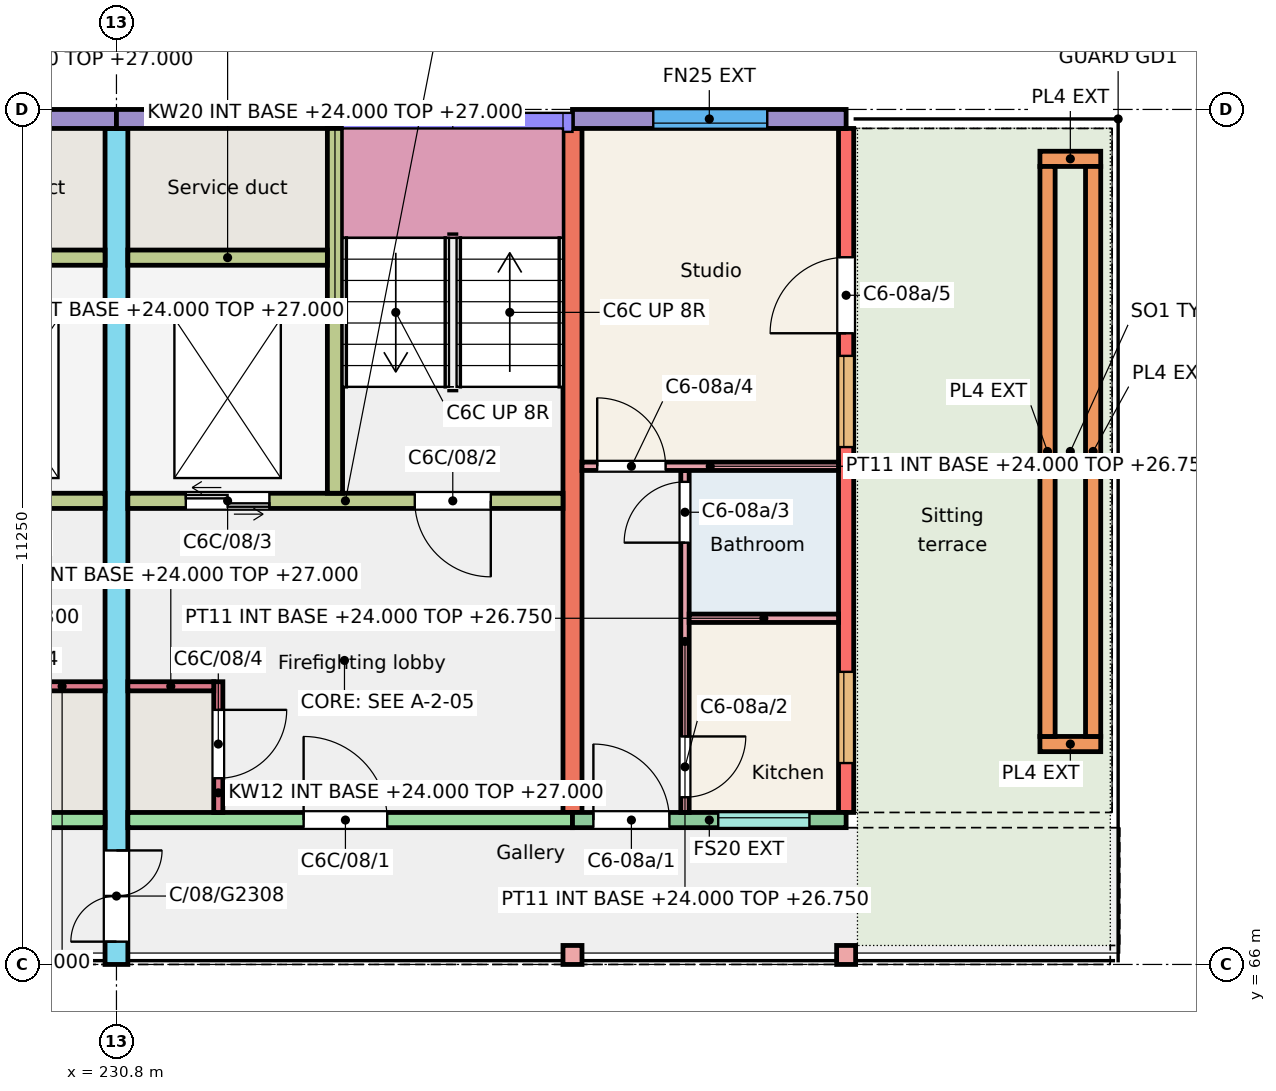
"""IFC4 building model, lengths in metres.
Left out: names, types, materials, properties, quantities, classifications, styles, units other than length and angle.
Written with IfcOpenShell. Run it as: python <this file> out.ifc"""

import sys

from ifc_helpers import new_model, si_unit, direction, frame, frame_2d, origin, origin_2d, place, context, subcontext, project, spatial, rectangle, extrude, element, fill, save


model = new_model("IFC4")
c1 = context("Model", 3, precision=1e-05, world=origin(), true_north=direction((0.0, 1.0)))
c2 = subcontext(c1, "Body", "Model", "MODEL_VIEW")
j1 = project(units=[si_unit("LENGTHUNIT", "METRE"), si_unit("PLANEANGLEUNIT", "RADIAN")], contexts=[c1])
p1 = place(None, origin())
s1 = spatial("IfcSite", under=j1, at=p1, CompositionType="ELEMENT")
p2 = place(p1, origin())
s2 = spatial("IfcBuilding", under=s1, at=p2, CompositionType="ELEMENT")
p3 = place(p2, frame((0.0, 0.0, 24.0)))
s3 = spatial("IfcBuildingStorey", under=s2, at=p3, CompositionType="ELEMENT", Elevation=24.0)
p4 = place(p3, frame((230.8, 66.0, 0.0), z_axis=(0.0, 0.0, 1.0), x_axis=(0.0, 1.0, 0.0)))
e1 = element("IfcWall", 1, at=p4, inside=s3, PredefinedType="SHEAR", context=c2, shape_type="SweptSolid", body=[
    extrude(rectangle(XDim=11.0, YDim=0.3, at=frame_2d((5.5, 0.0))), origin(), (0.0, 0.0, 1.0), 3.0),
])
p5 = place(p4, frame((0.3, 0.0, 0.0)))
e2 = element("IfcOpeningElement", 2, at=p5, cuts=e1, PredefinedType="OPENING", context=c2, shape_type="SweptSolid", body=[
    extrude(rectangle(XDim=1.2, YDim=2.1, at=frame_2d((0.6, 1.05))), frame((0.0, 0.16, 0.0), z_axis=(0.0, -1.0, 0.0), x_axis=(1.0, 0.0, 0.0)), (0.0, 0.0, 1.0), 0.32),
])
p6 = place(p3, frame((236.8, 68.0, 0.0), z_axis=(0.0, 0.0, 1.0), x_axis=(0.0, 1.0, 0.0)))
e3 = element("IfcWall", 3, at=p6, inside=s3, PredefinedType="SHEAR", context=c2, shape_type="SweptSolid", body=[
    extrude(rectangle(XDim=9.0, YDim=0.25, at=frame_2d((4.5, 0.0))), origin(), (0.0, 0.0, 1.0), 3.0),
])
p7 = place(p3, frame((240.4, 68.0, 0.0), z_axis=(0.0, 0.0, 1.0), x_axis=(0.0, 1.0, 0.0)))
e4 = element("IfcWall", 4, at=p7, inside=s3, PredefinedType="SHEAR", context=c2, shape_type="SweptSolid", body=[
    extrude(rectangle(XDim=9.0, YDim=0.2, at=frame_2d((4.5, 0.0))), origin(), (0.0, 0.0, 1.0), 3.0),
])
p8 = place(p7, frame((0.65, 0.0, 0.9)))
e5 = element("IfcOpeningElement", 5, at=p8, cuts=e4, PredefinedType="OPENING", context=c2, shape_type="SweptSolid", body=[
    extrude(rectangle(XDim=1.2, YDim=1.5, at=frame_2d((0.6, 0.75))), frame((0.0, 0.11, 0.0), z_axis=(0.0, -1.0, 0.0), x_axis=(1.0, 0.0, 0.0)), (0.0, 0.0, 1.0), 0.22),
])
p9 = place(p7, frame((4.808, 0.0, 0.9)))
e6 = element("IfcOpeningElement", 6, at=p9, cuts=e4, PredefinedType="OPENING", context=c2, shape_type="SweptSolid", body=[
    extrude(rectangle(XDim=1.2, YDim=1.5, at=frame_2d((0.6, 0.75))), frame((0.0, 0.11, 0.0), z_axis=(0.0, -1.0, 0.0), x_axis=(1.0, 0.0, 0.0)), (0.0, 0.0, 1.0), 0.22),
])
p10 = place(p7, frame((6.305, 0.0, 0.0)))
e7 = element("IfcOpeningElement", 7, at=p10, cuts=e4, PredefinedType="OPENING", context=c2, shape_type="SweptSolid", body=[
    extrude(rectangle(XDim=1.0, YDim=2.1, at=frame_2d((0.5, 1.05))), frame((0.0, 0.11, 0.0), z_axis=(0.0, -1.0, 0.0), x_axis=(1.0, 0.0, 0.0)), (0.0, 0.0, 1.0), 0.22),
])
p11 = place(p3, frame((227.825, 77.125, 0.0), z_axis=(0.0, 0.0, 1.0), x_axis=(1.0, 0.0, 0.0)))
e8 = element("IfcWall", 8, at=p11, inside=s3, PredefinedType="SOLIDWALL", context=c2, shape_type="SweptSolid", body=[
    extrude(rectangle(XDim=2.975, YDim=0.25, at=frame_2d((1.488, 0.0))), origin(), (0.0, 0.0, 1.0), 3.0),
])
p12 = place(p3, frame((224.8, 67.9, 0.0), z_axis=(0.0, 0.0, 1.0), x_axis=(1.0, 0.0, 0.0)))
e9 = element("IfcWall", 9, at=p12, inside=s3, PredefinedType="SHEAR", context=c2, shape_type="SweptSolid", body=[
    extrude(rectangle(XDim=5.85, YDim=0.2, at=frame_2d((2.925, 0.0))), origin(), (0.0, 0.0, 1.0), 3.0),
])
p13 = place(p12, frame((2.438, 0.0, 0.0)))
e10 = element("IfcOpeningElement", 10, at=p13, cuts=e9, PredefinedType="OPENING", context=c2, shape_type="SweptSolid", body=[
    extrude(rectangle(XDim=1.1, YDim=2.1, at=frame_2d((0.55, 1.05))), frame((0.0, 0.11, 0.0), z_axis=(0.0, -1.0, 0.0), x_axis=(1.0, 0.0, 0.0)), (0.0, 0.0, 1.0), 0.22),
])
p14 = place(p3, frame((224.925, 72.1, 0.0), z_axis=(0.0, 0.0, 1.0), x_axis=(1.0, 0.0, 0.0)))
e11 = element("IfcWall", 11, at=p14, inside=s3, PredefinedType="SHEAR", context=c2, shape_type="SweptSolid", body=[
    extrude(rectangle(XDim=5.725, YDim=0.2, at=frame_2d((2.862, 0.0))), origin(), (0.0, 0.0, 1.0), 3.0),
])
p15 = place(p14, frame((0.95, 0.0, 0.0)))
e12 = element("IfcOpeningElement", 12, at=p15, cuts=e11, PredefinedType="OPENING", context=c2, shape_type="SweptSolid", body=[
    extrude(rectangle(XDim=1.0, YDim=2.1, at=frame_2d((0.5, 1.05))), frame((0.0, 0.11, 0.0), z_axis=(0.0, -1.0, 0.0), x_axis=(1.0, 0.0, 0.0)), (0.0, 0.0, 1.0), 0.22),
])
p16 = place(p14, frame((3.863, 0.0, 0.0)))
e13 = element("IfcOpeningElement", 13, at=p16, cuts=e11, PredefinedType="OPENING", context=c2, shape_type="SweptSolid", body=[
    extrude(rectangle(XDim=1.1, YDim=2.1, at=frame_2d((0.55, 1.05))), frame((0.0, 0.11, 0.0), z_axis=(0.0, -1.0, 0.0), x_axis=(1.0, 0.0, 0.0)), (0.0, 0.0, 1.0), 0.22),
])
p17 = place(p3, frame((228.025, 75.3, 0.0), z_axis=(0.0, 0.0, 1.0), x_axis=(1.0, 0.0, 0.0)))
e14 = element("IfcWall", 14, at=p17, inside=s3, PredefinedType="SHEAR", context=c2, shape_type="SweptSolid", body=[
    extrude(rectangle(XDim=2.625, YDim=0.2, at=frame_2d((1.312, 0.0))), origin(), (0.0, 0.0, 1.0), 3.0),
])
p18 = place(p3, frame((229.52, 69.66, 0.0), z_axis=(0.0, 0.0, 1.0), x_axis=(1.0, 0.0, 0.0)))
e15 = element("IfcWall", 15, at=p18, inside=s3, PredefinedType="SHEAR", context=c2, shape_type="SweptSolid", body=[
    extrude(rectangle(XDim=1.13, YDim=0.12, at=frame_2d((0.565, 0.0))), origin(), (0.0, 0.0, 1.0), 3.0),
])
p19 = place(p3, frame((230.8, 77.125, 0.0), z_axis=(0.0, 0.0, 1.0), x_axis=(1.0, 0.0, 0.0)))
e16 = element("IfcWall", 16, at=p19, inside=s3, PredefinedType="SOLIDWALL", context=c2, shape_type="SweptSolid", body=[
    extrude(rectangle(XDim=2.975, YDim=0.25, at=frame_2d((1.487, 0.0))), origin(), (0.0, 0.0, 1.0), 3.0),
])
p20 = place(p3, frame((230.95, 67.9, 0.0), z_axis=(0.0, 0.0, 1.0), x_axis=(1.0, 0.0, 0.0)))
e17 = element("IfcWall", 17, at=p20, inside=s3, PredefinedType="SHEAR", context=c2, shape_type="SweptSolid", body=[
    extrude(rectangle(XDim=5.85, YDim=0.2, at=frame_2d((2.925, 0.0))), origin(), (0.0, 0.0, 1.0), 3.0),
])
p21 = place(p20, frame((2.312, 0.0, 0.0)))
e18 = element("IfcOpeningElement", 18, at=p21, cuts=e17, PredefinedType="OPENING", context=c2, shape_type="SweptSolid", body=[
    extrude(rectangle(XDim=1.1, YDim=2.1, at=frame_2d((0.55, 1.05))), frame((0.0, 0.11, 0.0), z_axis=(0.0, -1.0, 0.0), x_axis=(1.0, 0.0, 0.0)), (0.0, 0.0, 1.0), 0.22),
])
p22 = place(p3, frame((230.95, 72.1, 0.0), z_axis=(0.0, 0.0, 1.0), x_axis=(1.0, 0.0, 0.0)))
e19 = element("IfcWall", 19, at=p22, inside=s3, PredefinedType="SHEAR", context=c2, shape_type="SweptSolid", body=[
    extrude(rectangle(XDim=5.725, YDim=0.2, at=frame_2d((2.863, 0.0))), origin(), (0.0, 0.0, 1.0), 3.0),
])
p23 = place(p22, frame((3.775, 0.0, 0.0)))
e20 = element("IfcOpeningElement", 20, at=p23, cuts=e19, PredefinedType="OPENING", context=c2, shape_type="SweptSolid", body=[
    extrude(rectangle(XDim=1.0, YDim=2.1, at=frame_2d((0.5, 1.05))), frame((0.0, 0.11, 0.0), z_axis=(0.0, -1.0, 0.0), x_axis=(1.0, 0.0, 0.0)), (0.0, 0.0, 1.0), 0.22),
])
p24 = place(p22, frame((0.762, 0.0, 0.0)))
e21 = element("IfcOpeningElement", 21, at=p24, cuts=e19, PredefinedType="OPENING", context=c2, shape_type="SweptSolid", body=[
    extrude(rectangle(XDim=1.1, YDim=2.1, at=frame_2d((0.55, 1.05))), frame((0.0, 0.11, 0.0), z_axis=(0.0, -1.0, 0.0), x_axis=(1.0, 0.0, 0.0)), (0.0, 0.0, 1.0), 0.22),
])
p25 = place(p3, frame((233.675, 72.2, 0.0), z_axis=(0.0, 0.0, 1.0), x_axis=(0.0, 1.0, 0.0)))
e22 = element("IfcWall", 22, at=p25, inside=s3, PredefinedType="SHEAR", context=c2, shape_type="SweptSolid", body=[
    extrude(rectangle(XDim=4.8, YDim=0.2, at=frame_2d((2.4, 0.0))), origin(), (0.0, 0.0, 1.0), 3.0),
])
p26 = place(p3, frame((230.95, 75.3, 0.0), z_axis=(0.0, 0.0, 1.0), x_axis=(1.0, 0.0, 0.0)))
e23 = element("IfcWall", 23, at=p26, inside=s3, PredefinedType="SHEAR", context=c2, shape_type="SweptSolid", body=[
    extrude(rectangle(XDim=2.625, YDim=0.2, at=frame_2d((1.312, 0.0))), origin(), (0.0, 0.0, 1.0), 3.0),
])
p27 = place(p3, frame((232.14, 68.0, 0.0), z_axis=(0.0, 0.0, 1.0), x_axis=(0.0, 1.0, 0.0)))
e24 = element("IfcWall", 24, at=p27, inside=s3, PredefinedType="SHEAR", context=c2, shape_type="SweptSolid", body=[
    extrude(rectangle(XDim=1.72, YDim=0.12, at=frame_2d((0.86, 0.0))), origin(), (0.0, 0.0, 1.0), 3.0),
])
p28 = place(p27, frame((0.45, 0.0, 0.0)))
e25 = element("IfcOpeningElement", 25, at=p28, cuts=e24, PredefinedType="OPENING", context=c2, shape_type="SweptSolid", body=[
    extrude(rectangle(XDim=0.9, YDim=2.1, at=frame_2d((0.45, 1.05))), frame((0.0, 0.07, 0.0), z_axis=(0.0, -1.0, 0.0), x_axis=(1.0, 0.0, 0.0)), (0.0, 0.0, 1.0), 0.14),
])
p29 = place(p3, frame((230.95, 69.66, 0.0), z_axis=(0.0, 0.0, 1.0), x_axis=(1.0, 0.0, 0.0)))
e26 = element("IfcWall", 26, at=p29, inside=s3, PredefinedType="SHEAR", context=c2, shape_type="SweptSolid", body=[
    extrude(rectangle(XDim=1.13, YDim=0.12, at=frame_2d((0.565, 0.0))), origin(), (0.0, 0.0, 1.0), 3.0),
])
p30 = place(p3, frame((236.8, 77.125, 0.0), z_axis=(0.0, 0.0, 1.0), x_axis=(1.0, 0.0, 0.0)))
e27 = element("IfcWall", 27, at=p30, inside=s3, PredefinedType="SOLIDWALL", context=c2, shape_type="SweptSolid", body=[
    extrude(rectangle(XDim=3.6, YDim=0.25, at=frame_2d((1.8, 0.0))), origin(), (0.0, 0.0, 1.0), 3.0),
])
p31 = place(p30, frame((1.062, 0.0, 0.9)))
e28 = element("IfcOpeningElement", 28, at=p31, cuts=e27, PredefinedType="OPENING", context=c2, shape_type="SweptSolid", body=[
    extrude(rectangle(XDim=1.5, YDim=1.5, at=frame_2d((0.75, 0.75))), frame((0.0, 0.135, 0.0), z_axis=(0.0, -1.0, 0.0), x_axis=(1.0, 0.0, 0.0)), (0.0, 0.0, 1.0), 0.27),
])
p32 = place(p3, frame((236.8, 67.9, 0.0), z_axis=(0.0, 0.0, 1.0), x_axis=(1.0, 0.0, 0.0)))
e29 = element("IfcWall", 29, at=p32, inside=s3, PredefinedType="SOLIDWALL", context=c2, shape_type="SweptSolid", body=[
    extrude(rectangle(XDim=3.6, YDim=0.2, at=frame_2d((1.8, 0.0))), origin(), (0.0, 0.0, 1.0), 3.0),
])
p33 = place(p32, frame((1.917, 0.0, 1.1)))
e30 = element("IfcOpeningElement", 30, at=p33, cuts=e29, PredefinedType="OPENING", context=c2, shape_type="SweptSolid", body=[
    extrude(rectangle(XDim=1.2, YDim=1.3, at=frame_2d((0.6, 0.65))), frame((0.0, 0.11, 0.0), z_axis=(0.0, -1.0, 0.0), x_axis=(1.0, 0.0, 0.0)), (0.0, 0.0, 1.0), 0.22),
])
p34 = place(p32, frame((0.275, 0.0, 0.0)))
e31 = element("IfcOpeningElement", 31, at=p34, cuts=e29, PredefinedType="OPENING", context=c2, shape_type="SweptSolid", body=[
    extrude(rectangle(XDim=1.0, YDim=2.1, at=frame_2d((0.5, 1.05))), frame((0.0, 0.11, 0.0), z_axis=(0.0, -1.0, 0.0), x_axis=(1.0, 0.0, 0.0)), (0.0, 0.0, 1.0), 0.22),
])
for number, where, z_axis, x_axis in (
    (32, (236.8, 66.125, 0.0), (0.0, 0.0, 1.0), (1.0, 0.0, 0.0)),
    (33, (240.4, 66.125, 0.0), (0.0, 0.0, 1.0), (1.0, 0.0, 0.0)),
):
    element("IfcColumn", number, at=place(p3, frame(where, z_axis=z_axis, x_axis=x_axis)), inside=s3, PredefinedType="COLUMN", context=c2, shape_type="SweptSolid", body=[
        extrude(rectangle(XDim=0.25, YDim=0.25, at=origin_2d()), origin(), (0.0, 0.0, 1.0), 3.0),
    ])
for number, where, z_axis, x_axis in (
    (34, (242.95, 68.9, 0.01), (0.0, 0.0, 1.0), (1.0, 0.0, 0.0)),
    (35, (242.95, 76.6, 0.01), (0.0, 0.0, 1.0), (1.0, 0.0, 0.0)),
):
    element("IfcWall", number, at=place(p3, frame(where, z_axis=z_axis, x_axis=x_axis)), inside=s3, PredefinedType="SOLIDWALL", context=c2, shape_type="SweptSolid", body=[
        extrude(rectangle(XDim=0.8, YDim=0.2, at=frame_2d((0.4, 0.0))), origin(), (0.0, 0.0, 1.0), 0.45),
    ])
for number, where, z_axis, x_axis in (
    (36, (243.05, 69.0, 0.01), (0.0, 0.0, 1.0), (0.0, 1.0, 0.0)),
    (37, (243.65, 69.0, 0.01), (0.0, 0.0, 1.0), (0.0, 1.0, 0.0)),
):
    element("IfcWall", number, at=place(p3, frame(where, z_axis=z_axis, x_axis=x_axis)), inside=s3, PredefinedType="SOLIDWALL", context=c2, shape_type="SweptSolid", body=[
        extrude(rectangle(XDim=7.5, YDim=0.2, at=frame_2d((3.75, 0.0))), origin(), (0.0, 0.0, 1.0), 0.45),
    ])
p35 = place(p3, frame((238.28, 68.0, 0.0), z_axis=(0.0, 0.0, 1.0), x_axis=(0.0, 1.0, 0.0)))
e38 = element("IfcWall", 38, at=p35, inside=s3, PredefinedType="PARTITIONING", context=c2, shape_type="SweptSolid", body=[
    extrude(rectangle(XDim=4.5, YDim=0.11, at=frame_2d((2.25, 0.0))), origin(), (0.0, 0.0, 1.0), 2.75),
])
p36 = place(p35, frame((0.2, 0.0, 0.0)))
e39 = element("IfcOpeningElement", 39, at=p36, cuts=e38, PredefinedType="OPENING", context=c2, shape_type="SweptSolid", body=[
    extrude(rectangle(XDim=0.8, YDim=2.1, at=frame_2d((0.4, 1.05))), frame((0.0, 0.065, 0.0), z_axis=(0.0, -1.0, 0.0), x_axis=(1.0, 0.0, 0.0)), (0.0, 0.0, 1.0), 0.13),
])
p37 = place(p35, frame((3.55, 0.0, 0.0)))
e40 = element("IfcOpeningElement", 40, at=p37, cuts=e38, PredefinedType="OPENING", context=c2, shape_type="SweptSolid", body=[
    extrude(rectangle(XDim=0.8, YDim=2.1, at=frame_2d((0.4, 1.05))), frame((0.0, 0.065, 0.0), z_axis=(0.0, -1.0, 0.0), x_axis=(1.0, 0.0, 0.0)), (0.0, 0.0, 1.0), 0.13),
])
p38 = place(p3, frame((238.335, 70.555, 0.0), z_axis=(0.0, 0.0, 1.0), x_axis=(1.0, 0.0, 0.0)))
e41 = element("IfcWall", 41, at=p38, inside=s3, PredefinedType="PARTITIONING", context=c2, shape_type="SweptSolid", body=[
    extrude(rectangle(XDim=1.965, YDim=0.11, at=frame_2d((0.982, 0.0))), origin(), (0.0, 0.0, 1.0), 2.75),
])
p39 = place(p3, frame((236.925, 72.555, 0.0), z_axis=(0.0, 0.0, 1.0), x_axis=(1.0, 0.0, 0.0)))
e42 = element("IfcWall", 42, at=p39, inside=s3, PredefinedType="PARTITIONING", context=c2, shape_type="SweptSolid", body=[
    extrude(rectangle(XDim=3.375, YDim=0.11, at=frame_2d((1.688, 0.0))), origin(), (0.0, 0.0, 1.0), 2.75),
])
p40 = place(p39, frame((0.2, 0.0, 0.0)))
e43 = element("IfcOpeningElement", 43, at=p40, cuts=e42, PredefinedType="OPENING", context=c2, shape_type="SweptSolid", body=[
    extrude(rectangle(XDim=0.9, YDim=2.1, at=frame_2d((0.45, 1.05))), frame((0.0, 0.065, 0.0), z_axis=(0.0, -1.0, 0.0), x_axis=(1.0, 0.0, 0.0)), (0.0, 0.0, 1.0), 0.13),
])
p41 = place(p33, origin())
e44 = element("IfcWindow", 44, at=p41, inside=s3, PartitioningType="SINGLE_PANEL", PredefinedType="WINDOW", context=c2, shape_type="SweptSolid", body=[
    extrude(rectangle(XDim=1.2, YDim=1.3, at=frame_2d((0.6, 0.65))), frame((0.0, 0.06, 0.0), z_axis=(0.0, -1.0, 0.0), x_axis=(1.0, 0.0, 0.0)), (0.0, 0.0, 1.0), 0.06),
])
fill(e30, e44)
p42 = place(p31, origin())
e45 = element("IfcWindow", 45, at=p42, inside=s3, PartitioningType="SINGLE_PANEL", PredefinedType="WINDOW", context=c2, shape_type="SweptSolid", body=[
    extrude(rectangle(XDim=1.5, YDim=1.5, at=frame_2d((0.75, 0.75))), frame((0.0, -0.025, 0.0), z_axis=(0.0, -1.0, 0.0), x_axis=(1.0, 0.0, 0.0)), (0.0, 0.0, 1.0), 0.06),
])
fill(e28, e45)
p43 = place(p8, origin())
e46 = element("IfcWindow", 46, at=p43, inside=s3, PartitioningType="SINGLE_PANEL", PredefinedType="WINDOW", context=c2, shape_type="SweptSolid", body=[
    extrude(rectangle(XDim=1.2, YDim=1.5, at=frame_2d((0.6, 0.75))), frame((0.0, 0.06, 0.0), z_axis=(0.0, -1.0, 0.0), x_axis=(1.0, 0.0, 0.0)), (0.0, 0.0, 1.0), 0.06),
])
fill(e5, e46)
p44 = place(p9, origin())
e47 = element("IfcWindow", 47, at=p44, inside=s3, PartitioningType="SINGLE_PANEL", PredefinedType="WINDOW", context=c2, shape_type="SweptSolid", body=[
    extrude(rectangle(XDim=1.2, YDim=1.5, at=frame_2d((0.6, 0.75))), frame((0.0, 0.06, 0.0), z_axis=(0.0, -1.0, 0.0), x_axis=(1.0, 0.0, 0.0)), (0.0, 0.0, 1.0), 0.06),
])
fill(e6, e47)
p45 = place(p34, origin())
e48 = element("IfcDoor", 48, at=p45, inside=s3, OperationType="SINGLE_SWING_LEFT", PredefinedType="DOOR", context=c2, shape_type="SweptSolid", body=[
    extrude(rectangle(XDim=1.0, YDim=2.1, at=frame_2d((0.5, 1.05))), frame((0.0, 0.025, 0.0), z_axis=(0.0, -1.0, 0.0), x_axis=(1.0, 0.0, 0.0)), (0.0, 0.0, 1.0), 0.05),
])
fill(e31, e48)
p46 = place(p36, origin())
e49 = element("IfcDoor", 49, at=p46, inside=s3, OperationType="SINGLE_SWING_RIGHT", PredefinedType="DOOR", context=c2, shape_type="SweptSolid", body=[
    extrude(rectangle(XDim=0.8, YDim=2.1, at=frame_2d((0.4, 1.05))), frame((0.0, 0.025, 0.0), z_axis=(0.0, -1.0, 0.0), x_axis=(1.0, 0.0, 0.0)), (0.0, 0.0, 1.0), 0.05),
])
fill(e39, e49)
p47 = place(p37, origin())
e50 = element("IfcDoor", 50, at=p47, inside=s3, OperationType="SINGLE_SWING_LEFT", PredefinedType="DOOR", context=c2, shape_type="SweptSolid", body=[
    extrude(rectangle(XDim=0.8, YDim=2.1, at=frame_2d((0.4, 1.05))), frame((0.0, 0.025, 0.0), z_axis=(0.0, -1.0, 0.0), x_axis=(1.0, 0.0, 0.0)), (0.0, 0.0, 1.0), 0.05),
])
fill(e40, e50)
p48 = place(p40, origin())
e51 = element("IfcDoor", 51, at=p48, inside=s3, OperationType="SINGLE_SWING_LEFT", PredefinedType="DOOR", context=c2, shape_type="SweptSolid", body=[
    extrude(rectangle(XDim=0.9, YDim=2.1, at=frame_2d((0.45, 1.05))), frame((0.0, 0.025, 0.0), z_axis=(0.0, -1.0, 0.0), x_axis=(1.0, 0.0, 0.0)), (0.0, 0.0, 1.0), 0.05),
])
fill(e43, e51)
p49 = place(p10, origin())
e52 = element("IfcDoor", 52, at=p49, inside=s3, OperationType="SINGLE_SWING_LEFT", PredefinedType="DOOR", context=c2, shape_type="SweptSolid", body=[
    extrude(rectangle(XDim=1.0, YDim=2.1, at=frame_2d((0.5, 1.05))), frame((0.0, 0.025, 0.0), z_axis=(0.0, -1.0, 0.0), x_axis=(1.0, 0.0, 0.0)), (0.0, 0.0, 1.0), 0.05),
])
fill(e7, e52)
p50 = place(p21, origin())
e53 = element("IfcDoor", 53, at=p50, inside=s3, OperationType="SINGLE_SWING_LEFT", PredefinedType="DOOR", context=c2, shape_type="SweptSolid", body=[
    extrude(rectangle(XDim=1.1, YDim=2.1, at=frame_2d((0.55, 1.05))), frame((0.0, 0.025, 0.0), z_axis=(0.0, -1.0, 0.0), x_axis=(1.0, 0.0, 0.0)), (0.0, 0.0, 1.0), 0.05),
])
fill(e18, e53)
p51 = place(p23, origin())
e54 = element("IfcDoor", 54, at=p51, inside=s3, OperationType="SINGLE_SWING_RIGHT", PredefinedType="DOOR", context=c2, shape_type="SweptSolid", body=[
    extrude(rectangle(XDim=1.0, YDim=2.1, at=frame_2d((0.5, 1.05))), frame((0.0, 0.025, 0.0), z_axis=(0.0, -1.0, 0.0), x_axis=(1.0, 0.0, 0.0)), (0.0, 0.0, 1.0), 0.05),
])
fill(e20, e54)
p52 = place(p24, origin())
e55 = element("IfcDoor", 55, at=p52, inside=s3, OperationType="DOUBLE_DOOR_SLIDING", PredefinedType="DOOR", context=c2, shape_type="SweptSolid", body=[
    extrude(rectangle(XDim=1.1, YDim=2.1, at=frame_2d((0.55, 1.05))), frame((0.0, 0.025, 0.0), z_axis=(0.0, -1.0, 0.0), x_axis=(1.0, 0.0, 0.0)), (0.0, 0.0, 1.0), 0.05),
])
fill(e21, e55)
p53 = place(p28, origin())
e56 = element("IfcDoor", 56, at=p53, inside=s3, OperationType="SINGLE_SWING_RIGHT", PredefinedType="DOOR", context=c2, shape_type="SweptSolid", body=[
    extrude(rectangle(XDim=0.9, YDim=2.1, at=frame_2d((0.45, 1.05))), frame((0.0, 0.025, 0.0), z_axis=(0.0, -1.0, 0.0), x_axis=(1.0, 0.0, 0.0)), (0.0, 0.0, 1.0), 0.05),
])
fill(e25, e56)
p54 = place(p5, origin())
e57 = element("IfcDoor", 57, at=p54, inside=s3, OperationType="DOUBLE_DOOR_SINGLE_SWING", PredefinedType="DOOR", context=c2, shape_type="SweptSolid", body=[
    extrude(rectangle(XDim=1.2, YDim=2.1, at=frame_2d((0.6, 1.05))), frame((0.0, 0.025, 0.0), z_axis=(0.0, -1.0, 0.0), x_axis=(1.0, 0.0, 0.0)), (0.0, 0.0, 1.0), 0.05),
])
fill(e2, e57)
save(model, sys.argv[1])
